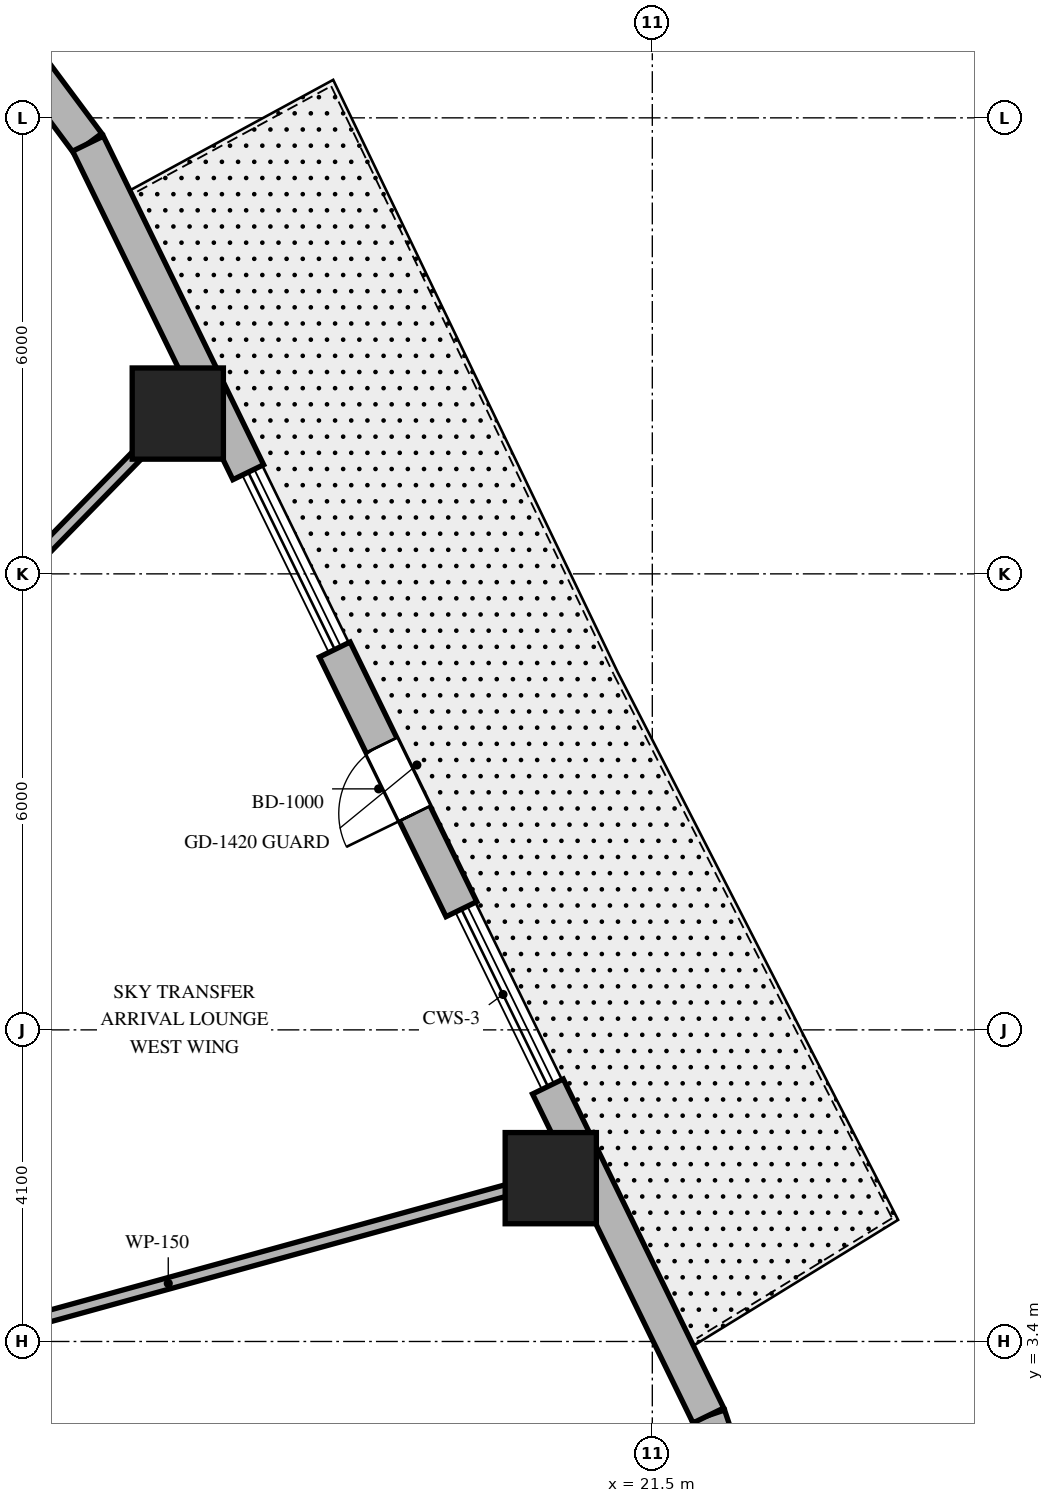
"""IFC4 building model, lengths in metres.
Left out: names, types, materials, properties, quantities, classifications, styles, units other than length and angle.
Written with IfcOpenShell. Run it as: python <this file> out.ifc"""

import sys

from ifc_helpers import new_model, si_unit, direction, frame, frame_2d, origin, origin_2d, place, context, subcontext, project, spatial, rectangle, extrude, element, fill, save


model = new_model("IFC4")
c1 = context("Model", 3, precision=1e-05, world=origin(), true_north=direction((0.0, 1.0)))
c2 = subcontext(c1, "Body", "Model", "MODEL_VIEW")
j1 = project(units=[si_unit("LENGTHUNIT", "METRE"), si_unit("PLANEANGLEUNIT", "RADIAN")], contexts=[c1])
p1 = place(None, origin())
s1 = spatial("IfcSite", under=j1, at=p1, CompositionType="ELEMENT")
p2 = place(p1, origin())
s2 = spatial("IfcBuilding", under=s1, at=p2, CompositionType="ELEMENT")
p3 = place(p2, frame((0.0, 0.0, 139.5)))
s3 = spatial("IfcBuildingStorey", under=s2, at=p3, CompositionType="ELEMENT", Elevation=139.5)
for number, where, z_axis, x_axis in (
    (1, (20.164, 5.549, 0.0), (0.0, 0.0, 1.0), (1.0, 0.0, 0.0)),
    (2, (15.257, 15.609, 0.0), (0.0, 0.0, 1.0), (1.0, 0.0, 0.0)),
):
    element("IfcColumn", number, at=place(p3, frame(where, z_axis=z_axis, x_axis=x_axis)), inside=s3, PredefinedType="COLUMN", context=c2, shape_type="SweptSolid", body=[
        extrude(rectangle(XDim=1.2, YDim=1.2, at=origin_2d()), origin(), (0.0, 0.0, 1.0), 4.8),
    ])
p4 = place(p3, frame((22.522, 1.577, 0.0), z_axis=(0.0, 0.0, 1.0), x_axis=(-0.317372694837, 0.948300887151, 0.0)))
e3 = element("IfcWall", 3, at=p4, inside=s3, PredefinedType="SOLIDWALL", context=c2, shape_type="SweptSolid", body=[
    extrude(rectangle(XDim=0.896, YDim=0.45, at=frame_2d((0.448, 0.0))), origin(), (0.0, 0.0, 1.0), 4.5),
])
p5 = place(p3, frame((14.076, 19.161, 0.0), z_axis=(0.0, 0.0, 1.0), x_axis=(-0.597226657159, 0.802072515412, 0.0)))
e4 = element("IfcWall", 4, at=p5, inside=s3, PredefinedType="SOLIDWALL", context=c2, shape_type="SweptSolid", body=[
    extrude(rectangle(XDim=1.269, YDim=0.45, at=frame_2d((0.635, 0.0))), origin(), (0.0, 0.0, 1.0), 4.5),
])
p6 = place(p3, frame((22.238, 2.427, 0.0), z_axis=(0.0, 0.0, 1.0), x_axis=(-0.438370693728, 0.898794267272, 0.0)))
e5 = element("IfcWall", 5, at=p6, inside=s3, PredefinedType="SOLIDWALL", context=c2, shape_type="SweptSolid", body=[
    extrude(rectangle(XDim=4.816, YDim=0.45, at=frame_2d((2.408, 0.0))), origin(), (0.0, 0.0, 1.0), 4.5),
])
p7 = place(p3, frame((18.988, 9.088, 0.0), z_axis=(0.0, 0.0, 1.0), x_axis=(-0.43837933929, 0.898790050503, 0.0)))
e6 = element("IfcWall", 6, at=p7, inside=s3, PredefinedType="SOLIDWALL", context=c2, shape_type="SweptSolid", body=[
    extrude(rectangle(XDim=3.801, YDim=0.45, at=frame_2d((1.9, 0.0))), origin(), (0.0, 0.0, 1.0), 4.5),
])
p8 = place(p7, frame((1.4, 0.0, 0.0)))
e7 = element("IfcOpeningElement", 7, at=p8, cuts=e6, PredefinedType="OPENING", context=c2, shape_type="SweptSolid", body=[
    extrude(rectangle(XDim=1.0, YDim=2.15, at=frame_2d((0.5, 1.075))), frame((0.0, 0.235, 0.0), z_axis=(0.0, -1.0, 0.0), x_axis=(1.0, 0.0, 0.0)), (0.0, 0.0, 1.0), 0.47),
])
p9 = place(p3, frame((16.184, 14.838, 0.0), z_axis=(0.0, 0.0, 1.0), x_axis=(-0.43837962648, 0.898789910428, 0.0)))
e8 = element("IfcWall", 8, at=p9, inside=s3, PredefinedType="SOLIDWALL", context=c2, shape_type="SweptSolid", body=[
    extrude(rectangle(XDim=4.81, YDim=0.45, at=frame_2d((2.405, 0.0))), origin(), (0.0, 0.0, 1.0), 4.5),
])
p10 = place(p3, frame((11.35, 3.123, 0.0), z_axis=(0.0, 0.0, 1.0), x_axis=(0.964151983214, 0.265350623261, 0.0)))
e9 = element("IfcWall", 9, at=p10, inside=s3, PredefinedType="PARTITIONING", context=c2, shape_type="SweptSolid", body=[
    extrude(rectangle(XDim=9.645, YDim=0.15, at=frame_2d((4.823, 0.0))), origin(), (0.0, 0.0, 1.0), 2.69),
])
p11 = place(p3, frame((9.628, 9.85, 0.0), z_axis=(0.0, 0.0, 1.0), x_axis=(0.698992824326, 0.715128681805, 0.0)))
e10 = element("IfcWall", 10, at=p11, inside=s3, PredefinedType="PARTITIONING", context=c2, shape_type="SweptSolid", body=[
    extrude(rectangle(XDim=8.579, YDim=0.15, at=frame_2d((4.29, 0.0))), origin(), (0.0, 0.0, 1.0), 2.69),
])
p12 = place(p8, origin())
e11 = element("IfcDoor", 11, at=p12, inside=s3, OperationType="SINGLE_SWING_LEFT", PredefinedType="DOOR", context=c2, shape_type="SweptSolid", body=[
    extrude(rectangle(XDim=1.0, YDim=2.15, at=frame_2d((0.5, 1.075))), frame((0.0, 0.025, 0.0), z_axis=(0.0, -1.0, 0.0), x_axis=(1.0, 0.0, 0.0)), (0.0, 0.0, 1.0), 0.05),
])
fill(e7, e11)
save(model, sys.argv[1])
